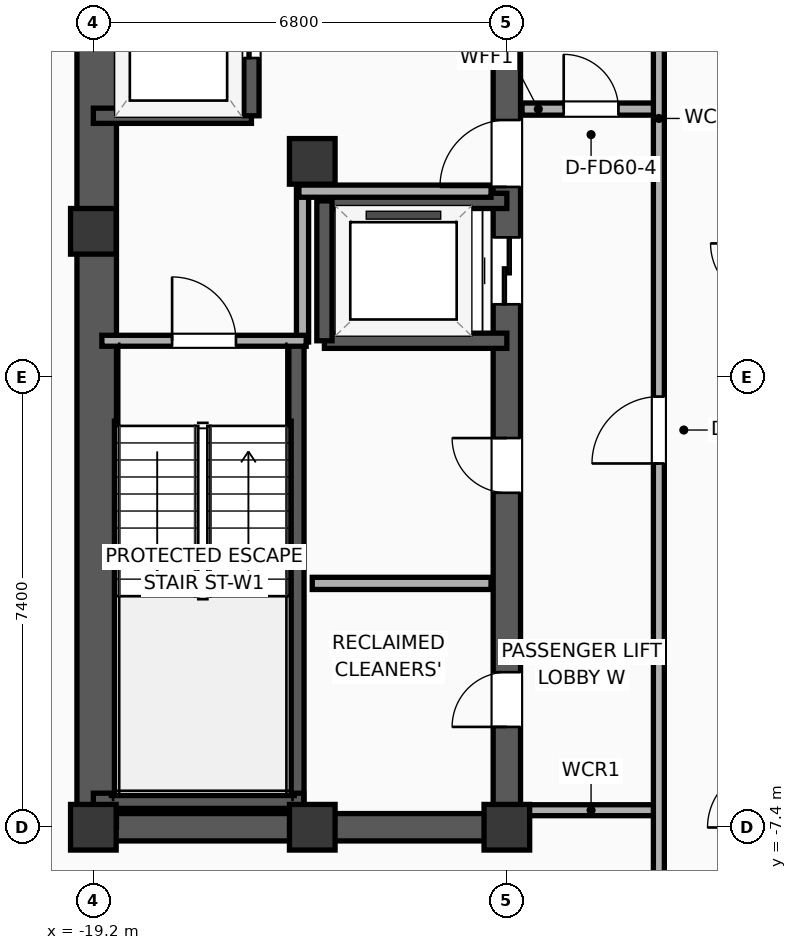
"""IFC4 building model, lengths in metres.
Left out: names, types, materials, properties, quantities, classifications, styles, units other than length and angle.
Written with IfcOpenShell. Run it as: python <this file> out.ifc"""

import sys

from ifc_helpers import new_model, si_unit, direction, frame, frame_2d, origin, origin_2d, place, context, subcontext, project, spatial, rectangle, extrude, element, fill, save


model = new_model("IFC4")
c1 = context("Model", 3, precision=1e-05, world=origin(), true_north=direction((0.0, 1.0)))
c2 = subcontext(c1, "Body", "Model", "MODEL_VIEW")
j1 = project(units=[si_unit("LENGTHUNIT", "METRE"), si_unit("PLANEANGLEUNIT", "RADIAN")], contexts=[c1])
p1 = place(None, origin())
s1 = spatial("IfcSite", under=j1, at=p1, CompositionType="ELEMENT")
p2 = place(p1, origin())
s2 = spatial("IfcBuilding", under=s1, at=p2, CompositionType="ELEMENT")
p3 = place(p2, frame((0.0, 0.0, 295.1)))
s3 = spatial("IfcBuildingStorey", under=s2, at=p3, CompositionType="ELEMENT", Elevation=295.1)
for number, where, z_axis, x_axis in (
    (1, (-19.2, -7.4, 0.0), (0.0, 0.0, 1.0), (1.0, 0.0, 0.0)),
    (2, (-19.2, 2.4, 0.0), (0.0, 0.0, 1.0), (1.0, 0.0, 0.0)),
    (3, (-15.6, -7.4, 0.0), (0.0, 0.0, 1.0), (1.0, 0.0, 0.0)),
    (4, (-12.4, -7.4, 0.0), (0.0, 0.0, 1.0), (1.0, 0.0, 0.0)),
    (5, (-15.6, 3.55, 0.0), (0.0, 0.0, 1.0), (1.0, 0.0, 0.0)),
):
    element("IfcColumn", number, at=place(p3, frame(where, z_axis=z_axis, x_axis=x_axis)), inside=s3, PredefinedType="COLUMN", context=c2, shape_type="SweptSolid", body=[
        extrude(rectangle(XDim=0.75, YDim=0.75, at=origin_2d()), origin(), (0.0, 0.0, 1.0), 3.9),
    ])
p4 = place(p3, frame((-19.425, -7.4, 0.0), z_axis=(0.0, 0.0, 1.0), x_axis=(1.0, 0.0, 0.0)))
e6 = element("IfcWall", 6, at=p4, inside=s3, PredefinedType="SHEAR", context=c2, shape_type="SweptSolid", body=[
    extrude(rectangle(XDim=7.25, YDim=0.45, at=frame_2d((3.625, 0.0))), origin(), (0.0, 0.0, 1.0), 3.635),
])
p5 = place(p3, frame((-19.145, -7.4, 0.0), z_axis=(0.0, 0.0, 1.0), x_axis=(0.0, 1.0, 0.0)))
e7 = element("IfcWall", 7, at=p5, inside=s3, PredefinedType="SHEAR", context=c2, shape_type="SweptSolid", body=[
    extrude(rectangle(XDim=14.8, YDim=0.65, at=frame_2d((7.4, 0.0))), origin(), (0.0, 0.0, 1.0), 3.635),
])
p6 = place(p3, frame((-12.4, -7.4, 0.0), z_axis=(0.0, 0.0, 1.0), x_axis=(0.0, 1.0, 0.0)))
e8 = element("IfcWall", 8, at=p6, inside=s3, PredefinedType="SHEAR", context=c2, shape_type="SweptSolid", body=[
    extrude(rectangle(XDim=14.8, YDim=0.45, at=frame_2d((7.4, 0.0))), origin(), (0.0, 0.0, 1.0), 3.635),
])
p7 = place(p6, frame((8.6, 0.0, 0.0)))
e9 = element("IfcOpeningElement", 9, at=p7, cuts=e8, PredefinedType="OPENING", context=c2, shape_type="SweptSolid", body=[
    extrude(rectangle(XDim=1.1, YDim=2.05, at=frame_2d((0.55, 1.025))), frame((0.0, 0.235, 0.0), z_axis=(0.0, -1.0, 0.0), x_axis=(1.0, 0.0, 0.0)), (0.0, 0.0, 1.0), 0.47),
])
p8 = place(p6, frame((10.53, 0.0, 0.0)))
e10 = element("IfcOpeningElement", 10, at=p8, cuts=e8, PredefinedType="OPENING", context=c2, shape_type="SweptSolid", body=[
    extrude(rectangle(XDim=1.1, YDim=2.05, at=frame_2d((0.55, 1.025))), frame((0.0, 0.235, 0.0), z_axis=(0.0, -1.0, 0.0), x_axis=(1.0, 0.0, 0.0)), (0.0, 0.0, 1.0), 0.47),
])
p9 = place(p6, frame((1.65, 0.0, 0.0)))
e11 = element("IfcOpeningElement", 11, at=p9, cuts=e8, PredefinedType="OPENING", context=c2, shape_type="SweptSolid", body=[
    extrude(rectangle(XDim=0.9, YDim=2.05, at=frame_2d((0.45, 1.025))), frame((0.0, 0.235, 0.0), z_axis=(0.0, -1.0, 0.0), x_axis=(1.0, 0.0, 0.0)), (0.0, 0.0, 1.0), 0.47),
])
p10 = place(p6, frame((5.5, 0.0, 0.0)))
e12 = element("IfcOpeningElement", 12, at=p10, cuts=e8, PredefinedType="OPENING", context=c2, shape_type="SweptSolid", body=[
    extrude(rectangle(XDim=0.9, YDim=2.05, at=frame_2d((0.45, 1.025))), frame((0.0, 0.235, 0.0), z_axis=(0.0, -1.0, 0.0), x_axis=(1.0, 0.0, 0.0)), (0.0, 0.0, 1.0), 0.47),
])
p11 = place(p3, frame((-15.86, -7.085, 0.0), z_axis=(0.0, 0.0, 1.0), x_axis=(0.0, 1.0, 0.0)))
e13 = element("IfcWall", 13, at=p11, inside=s3, PredefinedType="SOLIDWALL", context=c2, shape_type="SweptSolid", body=[
    extrude(rectangle(XDim=7.685, YDim=0.25, at=frame_2d((3.843, 0.0))), origin(), (0.0, 0.0, 1.0), 3.635),
])
p12 = place(p3, frame((-19.2, -6.965, 0.0), z_axis=(0.0, 0.0, 1.0), x_axis=(1.0, 0.0, 0.0)))
e14 = element("IfcWall", 14, at=p12, inside=s3, PredefinedType="SOLIDWALL", context=c2, shape_type="SweptSolid", body=[
    extrude(rectangle(XDim=3.46, YDim=0.25, at=frame_2d((1.73, 0.0))), origin(), (0.0, 0.0, 1.0), 3.635),
])
p13 = place(p3, frame((-19.2, 4.3, 0.0), z_axis=(0.0, 0.0, 1.0), x_axis=(1.0, 0.0, 0.0)))
e15 = element("IfcWall", 15, at=p13, inside=s3, PredefinedType="SOLIDWALL", context=c2, shape_type="SweptSolid", body=[
    extrude(rectangle(XDim=2.6, YDim=0.25, at=frame_2d((1.3, 0.0))), origin(), (0.0, 0.0, 1.0), 3.635),
])
p14 = place(p3, frame((-16.6, 4.3, 0.0), z_axis=(0.0, 0.0, 1.0), x_axis=(0.0, 1.0, 0.0)))
e16 = element("IfcWall", 16, at=p14, inside=s3, PredefinedType="SOLIDWALL", context=c2, shape_type="SweptSolid", body=[
    extrude(rectangle(XDim=3.1, YDim=0.25, at=frame_2d((1.55, 0.0))), origin(), (0.0, 0.0, 1.0), 3.635),
])
p15 = place(p14, frame((0.95, 0.0, 0.0)))
e17 = element("IfcOpeningElement", 17, at=p15, cuts=e16, PredefinedType="OPENING", context=c2, shape_type="SweptSolid", body=[
    extrude(rectangle(XDim=1.2, YDim=2.05, at=frame_2d((0.6, 1.025))), frame((0.0, 0.135, 0.0), z_axis=(0.0, -1.0, 0.0), x_axis=(1.0, 0.0, 0.0)), (0.0, 0.0, 1.0), 0.27),
])
for number, where, z_axis, x_axis in (
    (18, (-15.4, 0.6, 0.0), (0.0, 0.0, 1.0), (1.0, 0.0, 0.0)),
    (19, (-12.4, 2.9, 0.0), (0.0, 0.0, 1.0), (-1.0, 0.0, 0.0)),
):
    element("IfcWall", number, at=place(p3, frame(where, z_axis=z_axis, x_axis=x_axis)), inside=s3, PredefinedType="SOLIDWALL", context=c2, shape_type="SweptSolid", body=[
        extrude(rectangle(XDim=3.0, YDim=0.25, at=frame_2d((1.5, 0.0))), origin(), (0.0, 0.0, 1.0), 3.635),
    ])
p16 = place(p3, frame((-15.4, 2.9, 0.0), z_axis=(0.0, 0.0, 1.0), x_axis=(0.0, -1.0, 0.0)))
e20 = element("IfcWall", 20, at=p16, inside=s3, PredefinedType="SOLIDWALL", context=c2, shape_type="SweptSolid", body=[
    extrude(rectangle(XDim=2.3, YDim=0.25, at=frame_2d((1.15, 0.0))), origin(), (0.0, 0.0, 1.0), 3.635),
])
p17 = place(p3, frame((-15.76, 0.58, 0.0), z_axis=(0.0, 0.0, 1.0), x_axis=(0.0, 1.0, 0.0)))
e21 = element("IfcWall", 21, at=p17, inside=s3, PredefinedType="PARTITIONING", context=c2, shape_type="SweptSolid", body=[
    extrude(rectangle(XDim=2.52, YDim=0.2, at=frame_2d((1.26, 0.0))), origin(), (0.0, 0.0, 1.0), 3.635),
])
p18 = place(p3, frame((-15.82, 3.06, 0.0), z_axis=(0.0, 0.0, 1.0), x_axis=(1.0, 0.0, 0.0)))
e22 = element("IfcWall", 22, at=p18, inside=s3, PredefinedType="PARTITIONING", context=c2, shape_type="SweptSolid", body=[
    extrude(rectangle(XDim=3.16, YDim=0.2, at=frame_2d((1.58, 0.0))), origin(), (0.0, 0.0, 1.0), 3.635),
])
p19 = place(p3, frame((-19.06, 0.6, 0.0), z_axis=(0.0, 0.0, 1.0), x_axis=(1.0, 0.0, 0.0)))
e23 = element("IfcWall", 23, at=p19, inside=s3, PredefinedType="PARTITIONING", context=c2, shape_type="SweptSolid", body=[
    extrude(rectangle(XDim=3.36, YDim=0.18, at=frame_2d((1.68, 0.0))), origin(), (0.0, 0.0, 1.0), 3.635),
])
p20 = place(p19, frame((1.155, 0.0, 0.0)))
e24 = element("IfcOpeningElement", 24, at=p20, cuts=e23, PredefinedType="OPENING", context=c2, shape_type="SweptSolid", body=[
    extrude(rectangle(XDim=1.05, YDim=2.05, at=frame_2d((0.525, 1.025))), frame((0.0, 0.1, 0.0), z_axis=(0.0, -1.0, 0.0), x_axis=(1.0, 0.0, 0.0)), (0.0, 0.0, 1.0), 0.2),
])
p21 = place(p3, frame((-15.6, -3.39, 0.0), z_axis=(0.0, 0.0, 1.0), x_axis=(1.0, 0.0, 0.0)))
e25 = element("IfcWall", 25, at=p21, inside=s3, PredefinedType="PARTITIONING", context=c2, shape_type="SweptSolid", body=[
    extrude(rectangle(XDim=2.94, YDim=0.2, at=frame_2d((1.47, 0.0))), origin(), (0.0, 0.0, 1.0), 3.635),
])
p22 = place(p3, frame((-12.15, 4.41, 0.0), z_axis=(0.0, 0.0, 1.0), x_axis=(1.0, 0.0, 0.0)))
e26 = element("IfcWall", 26, at=p22, inside=s3, PredefinedType="PARTITIONING", context=c2, shape_type="SweptSolid", body=[
    extrude(rectangle(XDim=2.27, YDim=0.2, at=frame_2d((1.135, 0.0))), origin(), (0.0, 0.0, 1.0), 3.635),
])
p23 = place(p22, frame((0.685, 0.0, 0.0)))
e27 = element("IfcOpeningElement", 27, at=p23, cuts=e26, PredefinedType="OPENING", context=c2, shape_type="SweptSolid", body=[
    extrude(rectangle(XDim=0.9, YDim=2.05, at=frame_2d((0.45, 1.025))), frame((0.0, 0.11, 0.0), z_axis=(0.0, -1.0, 0.0), x_axis=(1.0, 0.0, 0.0)), (0.0, 0.0, 1.0), 0.22),
])
p24 = place(p3, frame((-12.15, -7.12, 0.0), z_axis=(0.0, 0.0, 1.0), x_axis=(1.0, 0.0, 0.0)))
e28 = element("IfcWall", 28, at=p24, inside=s3, PredefinedType="PARTITIONING", context=c2, shape_type="SweptSolid", body=[
    extrude(rectangle(XDim=2.27, YDim=0.18, at=frame_2d((1.135, 0.0))), origin(), (0.0, 0.0, 1.0), 3.635),
])
p25 = place(p3, frame((-9.9, -8.68, 0.0), z_axis=(0.0, 0.0, 1.0), x_axis=(0.0, 1.0, 0.0)))
e29 = element("IfcWall", 29, at=p25, inside=s3, PredefinedType="PARTITIONING", context=c2, shape_type="SweptSolid", body=[
    extrude(rectangle(XDim=17.36, YDim=0.18, at=frame_2d((8.68, 0.0))), origin(), (0.0, 0.0, 1.0), 3.635),
])
p26 = place(p25, frame((7.262, 0.0, 0.0)))
e30 = element("IfcOpeningElement", 30, at=p26, cuts=e29, PredefinedType="OPENING", context=c2, shape_type="SweptSolid", body=[
    extrude(rectangle(XDim=1.1, YDim=2.05, at=frame_2d((0.55, 1.025))), frame((0.0, 0.1, 0.0), z_axis=(0.0, -1.0, 0.0), x_axis=(1.0, 0.0, 0.0)), (0.0, 0.0, 1.0), 0.2),
])
p27 = place(p15, origin())
e31 = element("IfcDoor", 31, at=p27, inside=s3, OperationType="SLIDING_TO_LEFT", PredefinedType="DOOR", context=c2, shape_type="SweptSolid", body=[
    extrude(rectangle(XDim=1.2, YDim=2.05, at=frame_2d((0.6, 1.025))), frame((0.0, 0.025, 0.0), z_axis=(0.0, -1.0, 0.0), x_axis=(1.0, 0.0, 0.0)), (0.0, 0.0, 1.0), 0.05),
])
fill(e17, e31)
p28 = place(p7, origin())
e32 = element("IfcDoor", 32, at=p28, inside=s3, OperationType="SLIDING_TO_LEFT", PredefinedType="DOOR", context=c2, shape_type="SweptSolid", body=[
    extrude(rectangle(XDim=1.1, YDim=2.05, at=frame_2d((0.55, 1.025))), frame((0.0, 0.025, 0.0), z_axis=(0.0, -1.0, 0.0), x_axis=(1.0, 0.0, 0.0)), (0.0, 0.0, 1.0), 0.05),
])
fill(e9, e32)
p29 = place(p20, origin())
e33 = element("IfcDoor", 33, at=p29, inside=s3, OperationType="SINGLE_SWING_LEFT", PredefinedType="DOOR", context=c2, shape_type="SweptSolid", body=[
    extrude(rectangle(XDim=1.05, YDim=2.05, at=frame_2d((0.525, 1.025))), frame((0.0, 0.025, 0.0), z_axis=(0.0, -1.0, 0.0), x_axis=(1.0, 0.0, 0.0)), (0.0, 0.0, 1.0), 0.05),
])
fill(e24, e33)
p30 = place(p23, origin())
e34 = element("IfcDoor", 34, at=p30, inside=s3, OperationType="SINGLE_SWING_LEFT", PredefinedType="DOOR", context=c2, shape_type="SweptSolid", body=[
    extrude(rectangle(XDim=0.9, YDim=2.05, at=frame_2d((0.45, 1.025))), frame((0.0, 0.025, 0.0), z_axis=(0.0, -1.0, 0.0), x_axis=(1.0, 0.0, 0.0)), (0.0, 0.0, 1.0), 0.05),
])
fill(e27, e34)
p31 = place(p26, origin())
e35 = element("IfcDoor", 35, at=p31, inside=s3, OperationType="SINGLE_SWING_LEFT", PredefinedType="DOOR", context=c2, shape_type="SweptSolid", body=[
    extrude(rectangle(XDim=1.1, YDim=2.05, at=frame_2d((0.55, 1.025))), frame((0.0, 0.025, 0.0), z_axis=(0.0, -1.0, 0.0), x_axis=(1.0, 0.0, 0.0)), (0.0, 0.0, 1.0), 0.05),
])
fill(e30, e35)
p32 = place(p8, origin())
e36 = element("IfcDoor", 36, at=p32, inside=s3, OperationType="SINGLE_SWING_LEFT", PredefinedType="DOOR", context=c2, shape_type="SweptSolid", body=[
    extrude(rectangle(XDim=1.1, YDim=2.05, at=frame_2d((0.55, 1.025))), frame((0.0, 0.025, 0.0), z_axis=(0.0, -1.0, 0.0), x_axis=(1.0, 0.0, 0.0)), (0.0, 0.0, 1.0), 0.05),
])
fill(e10, e36)
p33 = place(p9, origin())
e37 = element("IfcDoor", 37, at=p33, inside=s3, OperationType="SINGLE_SWING_LEFT", PredefinedType="DOOR", context=c2, shape_type="SweptSolid", body=[
    extrude(rectangle(XDim=0.9, YDim=2.05, at=frame_2d((0.45, 1.025))), frame((0.0, 0.025, 0.0), z_axis=(0.0, -1.0, 0.0), x_axis=(1.0, 0.0, 0.0)), (0.0, 0.0, 1.0), 0.05),
])
fill(e11, e37)
p34 = place(p10, origin())
e38 = element("IfcDoor", 38, at=p34, inside=s3, OperationType="SINGLE_SWING_RIGHT", PredefinedType="DOOR", context=c2, shape_type="SweptSolid", body=[
    extrude(rectangle(XDim=0.9, YDim=2.05, at=frame_2d((0.45, 1.025))), frame((0.0, 0.025, 0.0), z_axis=(0.0, -1.0, 0.0), x_axis=(1.0, 0.0, 0.0)), (0.0, 0.0, 1.0), 0.05),
])
fill(e12, e38)
save(model, sys.argv[1])
